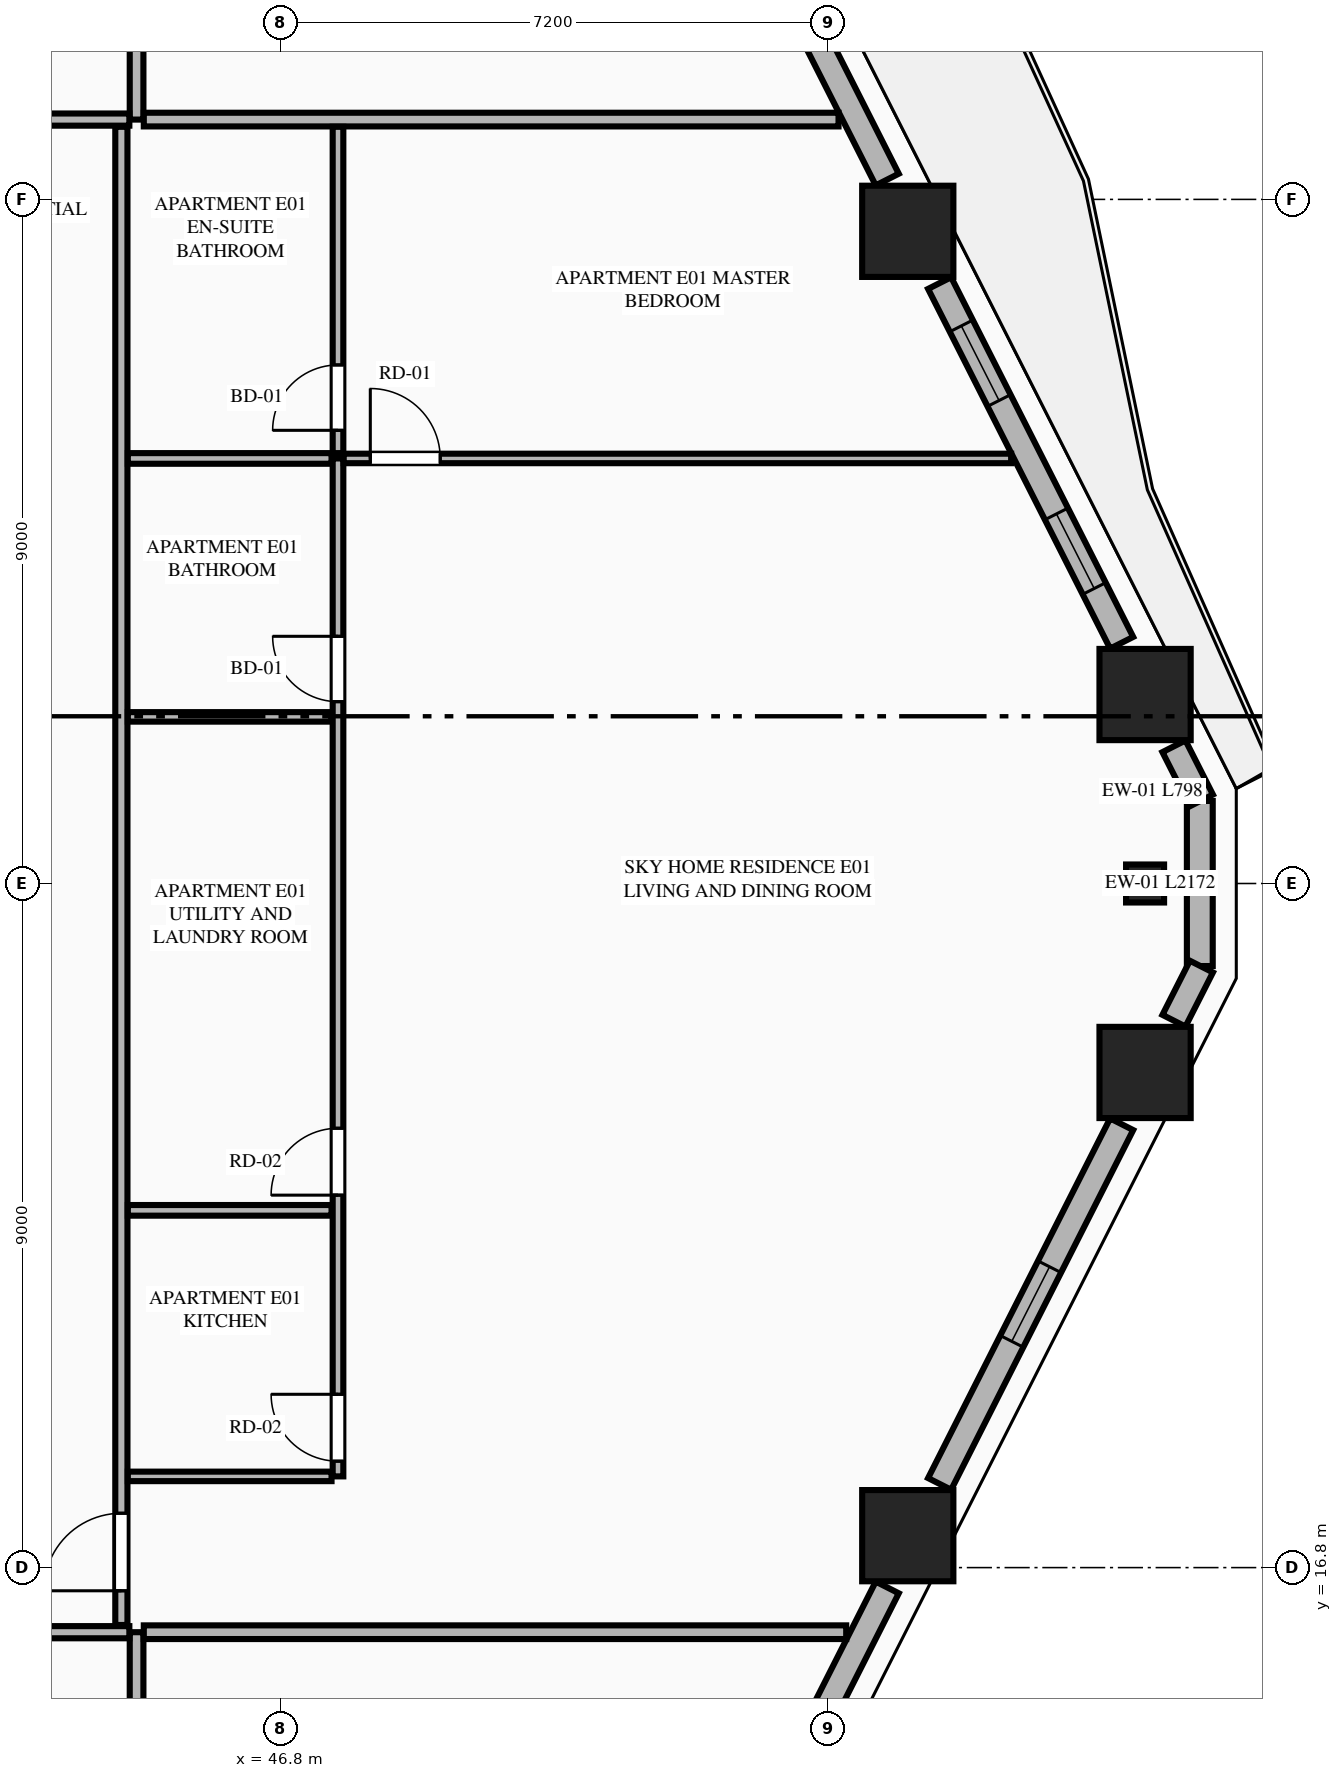
"""IFC4 building model, lengths in metres.
Left out: names, types, materials, properties, quantities, classifications, styles, units other than length and angle.
Written with IfcOpenShell. Run it as: python <this file> out.ifc"""

import sys

from ifc_helpers import new_model, si_unit, direction, frame, frame_2d, origin, origin_2d, place, context, subcontext, project, spatial, rectangle, extrude, element, fill, save


model = new_model("IFC4")
c1 = context("Model", 3, precision=1e-05, world=origin(), true_north=direction((0.0, 1.0)))
c2 = subcontext(c1, "Body", "Model", "MODEL_VIEW")
j1 = project(units=[si_unit("LENGTHUNIT", "METRE"), si_unit("PLANEANGLEUNIT", "RADIAN")], contexts=[c1])
p1 = place(None, origin())
s1 = spatial("IfcSite", under=j1, at=p1, CompositionType="ELEMENT")
p2 = place(p1, origin())
s2 = spatial("IfcBuilding", under=s1, at=p2, CompositionType="ELEMENT")
p3 = place(p2, frame((0.0, 0.0, 46.2)))
s3 = spatial("IfcBuildingStorey", under=s2, at=p3, CompositionType="ELEMENT", Elevation=46.2)
for number, where, z_axis, x_axis in (
    (1, (55.046, 17.22, 0.0), (0.0, 0.0, 1.0), (1.0, 0.0, 0.0)),
    (2, (58.168, 23.314, 0.0), (0.0, 0.0, 1.0), (1.0, 0.0, 0.0)),
    (3, (58.168, 28.286, 0.0), (0.0, 0.0, 1.0), (1.0, 0.0, 0.0)),
    (4, (55.046, 34.38, 0.0), (0.0, 0.0, 1.0), (1.0, 0.0, 0.0)),
):
    element("IfcColumn", number, at=place(p3, frame(where, z_axis=z_axis, x_axis=x_axis)), inside=s3, PredefinedType="COLUMN", context=c2, shape_type="SweptSolid", body=[
        extrude(rectangle(XDim=1.2, YDim=1.2, at=origin_2d()), origin(), (0.0, 0.0, 1.0), 3.55),
    ])
p4 = place(p3, frame((58.168, 25.8, 0.0), z_axis=(0.0, 0.0, 1.0), x_axis=(0.0, 1.0, 0.0)))
e5 = element("IfcColumn", 5, at=p4, inside=s3, PredefinedType="PILASTER", context=c2, shape_type="SweptSolid", body=[
    extrude(rectangle(XDim=0.5, YDim=0.35, at=origin_2d()), origin(), (0.0, 0.0, 1.0), 3.55),
])
p5 = place(p3, frame((58.888, 24.714, 0.0), z_axis=(0.0, 0.0, 1.0), x_axis=(0.0, 1.0, 0.0)))
e6 = element("IfcWall", 6, at=p5, inside=s3, PredefinedType="STANDARD", context=c2, shape_type="SweptSolid", body=[
    extrude(rectangle(XDim=2.172, YDim=0.34, at=frame_2d((1.086, 0.0))), origin(), (0.0, 0.0, 1.0), 3.33),
])
p6 = place(p3, frame((52.271, 11.59, 0.0), z_axis=(0.0, 0.0, 1.0), x_axis=(0.451592100298, 0.892224509273, 0.0)))
e7 = element("IfcWall", 7, at=p6, inside=s3, PredefinedType="STANDARD", context=c2, shape_type="SweptSolid", body=[
    extrude(rectangle(XDim=5.547, YDim=0.34, at=frame_2d((2.773, 0.0))), origin(), (0.0, 0.0, 1.0), 2.787),
])
p7 = place(p6, frame((2.223, 0.0, 0.75)))
e8 = element("IfcOpeningElement", 8, at=p7, cuts=e7, PredefinedType="OPENING", context=c2, shape_type="SweptSolid", body=[
    extrude(rectangle(XDim=1.1, YDim=1.887, at=frame_2d((0.55, 0.943))), frame((0.0, 0.18, 0.0), z_axis=(0.0, -1.0, 0.0), x_axis=(1.0, 0.0, 0.0)), (0.0, 0.0, 1.0), 0.36),
])
p8 = place(p3, frame((55.465, 17.901, 0.0), z_axis=(0.0, 0.0, 1.0), x_axis=(0.451572088722, 0.892234637686, 0.0)))
e9 = element("IfcWall", 9, at=p8, inside=s3, PredefinedType="STANDARD", context=c2, shape_type="SweptSolid", body=[
    extrude(rectangle(XDim=5.304, YDim=0.34, at=frame_2d((2.652, 0.0))), origin(), (0.0, 0.0, 1.0), 2.787),
])
p9 = place(p8, frame((2.102, 0.0, 0.75)))
e10 = element("IfcOpeningElement", 10, at=p9, cuts=e9, PredefinedType="OPENING", context=c2, shape_type="SweptSolid", body=[
    extrude(rectangle(XDim=1.1, YDim=1.887, at=frame_2d((0.55, 0.943))), frame((0.0, 0.18, 0.0), z_axis=(0.0, -1.0, 0.0), x_axis=(1.0, 0.0, 0.0)), (0.0, 0.0, 1.0), 0.36),
])
for number, where, z_axis, x_axis in (
    (11, (58.548, 23.995, 0.0), (0.0, 0.0, 1.0), (0.452, 0.892, 0.0)),
    (12, (58.909, 26.893, 0.0), (0.0, 0.0, 1.0), (-0.452, 0.892, 0.0)),
):
    element("IfcWall", number, at=place(p3, frame(where, z_axis=z_axis, x_axis=x_axis)), inside=s3, PredefinedType="STANDARD", context=c2, shape_type="SweptSolid", body=[
        extrude(rectangle(XDim=0.798, YDim=0.34, at=frame_2d((0.399, 0.0))), origin(), (0.0, 0.0, 1.0), 3.33),
    ])
p10 = place(p3, frame((57.86, 28.967, 0.0), z_axis=(0.0, 0.0, 1.0), x_axis=(-0.451590635984, 0.892225250422, 0.0)))
e13 = element("IfcWall", 13, at=p10, inside=s3, PredefinedType="STANDARD", context=c2, shape_type="SweptSolid", body=[
    extrude(rectangle(XDim=5.303, YDim=0.34, at=frame_2d((2.652, 0.0))), origin(), (0.0, 0.0, 1.0), 2.787),
])
p11 = place(p10, frame((0.8, 0.0, 0.75)))
e14 = element("IfcOpeningElement", 14, at=p11, cuts=e13, PredefinedType="OPENING", context=c2, shape_type="SweptSolid", body=[
    extrude(rectangle(XDim=1.1, YDim=1.887, at=frame_2d((0.55, 0.943))), frame((0.0, 0.18, 0.0), z_axis=(0.0, -1.0, 0.0), x_axis=(1.0, 0.0, 0.0)), (0.0, 0.0, 1.0), 0.36),
])
p12 = place(p10, frame((3.572, 0.0, 0.75)))
e15 = element("IfcOpeningElement", 15, at=p12, cuts=e13, PredefinedType="OPENING", context=c2, shape_type="SweptSolid", body=[
    extrude(rectangle(XDim=1.1, YDim=1.887, at=frame_2d((0.55, 0.943))), frame((0.0, 0.18, 0.0), z_axis=(0.0, -1.0, 0.0), x_axis=(1.0, 0.0, 0.0)), (0.0, 0.0, 1.0), 0.36),
])
p13 = place(p3, frame((54.776, 35.061, 0.0), z_axis=(0.0, 0.0, 1.0), x_axis=(-0.451592100298, 0.892224509273, 0.0)))
e16 = element("IfcWall", 16, at=p13, inside=s3, PredefinedType="STANDARD", context=c2, shape_type="SweptSolid", body=[
    extrude(rectangle(XDim=5.547, YDim=0.34, at=frame_2d((2.773, 0.0))), origin(), (0.0, 0.0, 1.0), 2.787),
])
p14 = place(p13, frame((2.791, 0.0, 0.0)))
e17 = element("IfcOpeningElement", 17, at=p14, cuts=e16, PredefinedType="OPENING", context=c2, shape_type="SweptSolid", body=[
    extrude(rectangle(XDim=1.1, YDim=2.25, at=frame_2d((0.55, 1.125))), frame((0.0, 0.18, 0.0), z_axis=(0.0, -1.0, 0.0), x_axis=(1.0, 0.0, 0.0)), (0.0, 0.0, 1.0), 0.36),
])
p15 = place(p3, frame((44.9, 2.455, 0.0), z_axis=(0.0, 0.0, 1.0), x_axis=(0.0, 1.0, 0.0)))
e18 = element("IfcWall", 18, at=p15, inside=s3, PredefinedType="PARTITIONING", context=c2, shape_type="SweptSolid", body=[
    extrude(rectangle(XDim=13.495, YDim=0.18, at=frame_2d((6.748, 0.0))), origin(), (0.0, 0.0, 1.0), 3.33),
])
p16 = place(p3, frame((19.995, 15.95, 0.0), z_axis=(0.0, 0.0, 1.0), x_axis=(1.0, 0.0, 0.0)))
e19 = element("IfcWall", 19, at=p16, inside=s3, PredefinedType="PARTITIONING", context=c2, shape_type="SweptSolid", body=[
    extrude(rectangle(XDim=24.81, YDim=0.16, at=frame_2d((12.405, 0.0))), origin(), (0.0, 0.0, 1.0), 3.33),
])
p17 = place(p16, frame((22.605, 0.0, 0.0)))
e20 = element("IfcOpeningElement", 20, at=p17, cuts=e19, PredefinedType="OPENING", context=c2, shape_type="SweptSolid", body=[
    extrude(rectangle(XDim=1.02, YDim=2.25, at=frame_2d((0.51, 1.125))), frame((0.0, 0.09, 0.0), z_axis=(0.0, -1.0, 0.0), x_axis=(1.0, 0.0, 0.0)), (0.0, 0.0, 1.0), 0.18),
])
p18 = place(p3, frame((44.9, 35.85, 0.0), z_axis=(0.0, 0.0, 1.0), x_axis=(0.0, 1.0, 0.0)))
e21 = element("IfcWall", 21, at=p18, inside=s3, PredefinedType="PARTITIONING", context=c2, shape_type="SweptSolid", body=[
    extrude(rectangle(XDim=13.295, YDim=0.18, at=frame_2d((6.647, 0.0))), origin(), (0.0, 0.0, 1.0), 3.33),
])
p19 = place(p3, frame((28.373, 35.85, 0.0), z_axis=(0.0, 0.0, 1.0), x_axis=(1.0, 0.0, 0.0)))
e22 = element("IfcWall", 22, at=p19, inside=s3, PredefinedType="PARTITIONING", context=c2, shape_type="SweptSolid", body=[
    extrude(rectangle(XDim=16.432, YDim=0.16, at=frame_2d((8.216, 0.0))), origin(), (0.0, 0.0, 1.0), 3.33),
])
p20 = place(p19, frame((0.355, 0.0, 0.0)))
e23 = element("IfcOpeningElement", 23, at=p20, cuts=e22, PredefinedType="OPENING", context=c2, shape_type="SweptSolid", body=[
    extrude(rectangle(XDim=1.35, YDim=2.35, at=frame_2d((0.675, 1.175))), frame((0.0, 0.09, 0.0), z_axis=(0.0, -1.0, 0.0), x_axis=(1.0, 0.0, 0.0)), (0.0, 0.0, 1.0), 0.18),
])
p21 = place(p3, frame((44.995, 15.95, 0.0), z_axis=(0.0, 0.0, 1.0), x_axis=(1.0, 0.0, 0.0)))
e24 = element("IfcWall", 24, at=p21, inside=s3, PredefinedType="PARTITIONING", context=c2, shape_type="SweptSolid", body=[
    extrude(rectangle(XDim=9.241, YDim=0.18, at=frame_2d((4.621, 0.0))), origin(), (0.0, 0.0, 1.0), 3.33),
])
p22 = place(p3, frame((44.995, 35.85, 0.0), z_axis=(0.0, 0.0, 1.0), x_axis=(1.0, 0.0, 0.0)))
e25 = element("IfcWall", 25, at=p22, inside=s3, PredefinedType="PARTITIONING", context=c2, shape_type="SweptSolid", body=[
    extrude(rectangle(XDim=9.14, YDim=0.18, at=frame_2d((4.57, 0.0))), origin(), (0.0, 0.0, 1.0), 3.33),
])
p23 = place(p3, frame((44.7, 16.045, 0.0), z_axis=(0.0, 0.0, 1.0), x_axis=(0.0, 1.0, 0.0)))
e26 = element("IfcWall", 26, at=p23, inside=s3, PredefinedType="PARTITIONING", context=c2, shape_type="SweptSolid", body=[
    extrude(rectangle(XDim=19.71, YDim=0.16, at=frame_2d((9.855, 0.0))), origin(), (0.0, 0.0, 1.0), 3.33),
])
p24 = place(p23, frame((0.45, 0.0, 0.0)))
e27 = element("IfcOpeningElement", 27, at=p24, cuts=e26, PredefinedType="OPENING", context=c2, shape_type="SweptSolid", body=[
    extrude(rectangle(XDim=1.02, YDim=2.25, at=frame_2d((0.51, 1.125))), frame((0.0, 0.09, 0.0), z_axis=(0.0, -1.0, 0.0), x_axis=(1.0, 0.0, 0.0)), (0.0, 0.0, 1.0), 0.18),
])
p25 = place(p3, frame((44.785, 18.0, 0.0), z_axis=(0.0, 0.0, 1.0), x_axis=(1.0, 0.0, 0.0)))
e28 = element("IfcWall", 28, at=p25, inside=s3, PredefinedType="PARTITIONING", context=c2, shape_type="SweptSolid", body=[
    extrude(rectangle(XDim=2.68, YDim=0.125, at=frame_2d((1.34, 0.0))), origin(), (0.0, 0.0, 1.0), 2.637),
])
p26 = place(p3, frame((47.55, 18.0, 0.0), z_axis=(0.0, 0.0, 1.0), x_axis=(0.0, 1.0, 0.0)))
e29 = element("IfcWall", 29, at=p26, inside=s3, PredefinedType="PLUMBINGWALL", context=c2, shape_type="SweptSolid", body=[
    extrude(rectangle(XDim=13.392, YDim=0.14, at=frame_2d((6.696, 0.0))), origin(), (0.0, 0.0, 1.0), 3.33),
])
p27 = place(p26, frame((0.2, 0.0, 0.0)))
e30 = element("IfcOpeningElement", 30, at=p27, cuts=e29, PredefinedType="OPENING", context=c2, shape_type="SweptSolid", body=[
    extrude(rectangle(XDim=0.88, YDim=2.15, at=frame_2d((0.44, 1.075))), frame((0.0, 0.08, 0.0), z_axis=(0.0, -1.0, 0.0), x_axis=(1.0, 0.0, 0.0)), (0.0, 0.0, 1.0), 0.16),
])
p28 = place(p26, frame((3.7, 0.0, 0.0)))
e31 = element("IfcOpeningElement", 31, at=p28, cuts=e29, PredefinedType="OPENING", context=c2, shape_type="SweptSolid", body=[
    extrude(rectangle(XDim=0.88, YDim=2.15, at=frame_2d((0.44, 1.075))), frame((0.0, 0.08, 0.0), z_axis=(0.0, -1.0, 0.0), x_axis=(1.0, 0.0, 0.0)), (0.0, 0.0, 1.0), 0.16),
])
p29 = place(p26, frame((10.192, 0.0, 0.0)))
e32 = element("IfcOpeningElement", 32, at=p29, cuts=e29, PredefinedType="OPENING", context=c2, shape_type="SweptSolid", body=[
    extrude(rectangle(XDim=0.86, YDim=2.1, at=frame_2d((0.43, 1.05))), frame((0.0, 0.08, 0.0), z_axis=(0.0, -1.0, 0.0), x_axis=(1.0, 0.0, 0.0)), (0.0, 0.0, 1.0), 0.16),
])
p30 = place(p3, frame((47.55, 31.462, 0.0), z_axis=(0.0, 0.0, 1.0), x_axis=(0.0, 1.0, 0.0)))
e33 = element("IfcWall", 33, at=p30, inside=s3, PredefinedType="PLUMBINGWALL", context=c2, shape_type="SweptSolid", body=[
    extrude(rectangle(XDim=4.293, YDim=0.14, at=frame_2d((2.146, 0.0))), origin(), (0.0, 0.0, 1.0), 3.33),
])
p31 = place(p30, frame((0.3, 0.0, 0.0)))
e34 = element("IfcOpeningElement", 34, at=p31, cuts=e33, PredefinedType="OPENING", context=c2, shape_type="SweptSolid", body=[
    extrude(rectangle(XDim=0.86, YDim=2.1, at=frame_2d((0.43, 1.05))), frame((0.0, 0.08, 0.0), z_axis=(0.0, -1.0, 0.0), x_axis=(1.0, 0.0, 0.0)), (0.0, 0.0, 1.0), 0.16),
])
p32 = place(p3, frame((44.785, 31.392, 0.0), z_axis=(0.0, 0.0, 1.0), x_axis=(1.0, 0.0, 0.0)))
e35 = element("IfcWall", 35, at=p32, inside=s3, PredefinedType="PLUMBINGWALL", context=c2, shape_type="SweptSolid", body=[
    extrude(rectangle(XDim=2.68, YDim=0.14, at=frame_2d((1.34, 0.0))), origin(), (0.0, 0.0, 1.0), 3.33),
])
p33 = place(p3, frame((47.625, 31.392, 0.0), z_axis=(0.0, 0.0, 1.0), x_axis=(1.0, 0.0, 0.0)))
e36 = element("IfcWall", 36, at=p33, inside=s3, PredefinedType="PARTITIONING", context=c2, shape_type="SweptSolid", body=[
    extrude(rectangle(XDim=8.781, YDim=0.125, at=frame_2d((4.391, 0.0))), origin(), (0.0, 0.0, 1.0), 3.33),
])
p34 = place(p33, frame((0.35, 0.0, 0.0)))
e37 = element("IfcOpeningElement", 37, at=p34, cuts=e36, PredefinedType="OPENING", context=c2, shape_type="SweptSolid", body=[
    extrude(rectangle(XDim=0.92, YDim=2.15, at=frame_2d((0.46, 1.075))), frame((0.0, 0.073, 0.0), z_axis=(0.0, -1.0, 0.0), x_axis=(1.0, 0.0, 0.0)), (0.0, 0.0, 1.0), 0.145),
])
p35 = place(p3, frame((44.785, 21.5, 0.0), z_axis=(0.0, 0.0, 1.0), x_axis=(1.0, 0.0, 0.0)))
e38 = element("IfcWall", 38, at=p35, inside=s3, PredefinedType="PLUMBINGWALL", context=c2, shape_type="SweptSolid", body=[
    extrude(rectangle(XDim=2.68, YDim=0.14, at=frame_2d((1.34, 0.0))), origin(), (0.0, 0.0, 1.0), 3.33),
])
p36 = place(p3, frame((44.785, 27.992, 0.0), z_axis=(0.0, 0.0, 1.0), x_axis=(1.0, 0.0, 0.0)))
e39 = element("IfcWall", 39, at=p36, inside=s3, PredefinedType="PARTITIONING", context=c2, shape_type="SweptSolid", body=[
    extrude(rectangle(XDim=2.68, YDim=0.125, at=frame_2d((1.34, 0.0))), origin(), (0.0, 0.0, 1.0), 3.33),
])
p37 = place(p9, origin())
e40 = element("IfcWindow", 40, at=p37, inside=s3, PartitioningType="SINGLE_PANEL", PredefinedType="WINDOW", context=c2, shape_type="SweptSolid", body=[
    extrude(rectangle(XDim=1.1, YDim=1.887, at=frame_2d((0.55, 0.943))), frame((0.0, 0.03, 0.0), z_axis=(0.0, -1.0, 0.0), x_axis=(1.0, 0.0, 0.0)), (0.0, 0.0, 1.0), 0.06),
])
fill(e10, e40)
p38 = place(p11, origin())
e41 = element("IfcWindow", 41, at=p38, inside=s3, PartitioningType="SINGLE_PANEL", PredefinedType="WINDOW", context=c2, shape_type="SweptSolid", body=[
    extrude(rectangle(XDim=1.1, YDim=1.887, at=frame_2d((0.55, 0.943))), frame((0.0, 0.03, 0.0), z_axis=(0.0, -1.0, 0.0), x_axis=(1.0, 0.0, 0.0)), (0.0, 0.0, 1.0), 0.06),
])
fill(e14, e41)
p39 = place(p27, origin())
e42 = element("IfcDoor", 42, at=p39, inside=s3, OperationType="SINGLE_SWING_RIGHT", PredefinedType="DOOR", context=c2, shape_type="SweptSolid", body=[
    extrude(rectangle(XDim=0.88, YDim=2.15, at=frame_2d((0.44, 1.075))), frame((0.0, 0.025, 0.0), z_axis=(0.0, -1.0, 0.0), x_axis=(1.0, 0.0, 0.0)), (0.0, 0.0, 1.0), 0.05),
])
fill(e30, e42)
p40 = place(p28, origin())
e43 = element("IfcDoor", 43, at=p40, inside=s3, OperationType="SINGLE_SWING_LEFT", PredefinedType="DOOR", context=c2, shape_type="SweptSolid", body=[
    extrude(rectangle(XDim=0.88, YDim=2.15, at=frame_2d((0.44, 1.075))), frame((0.0, 0.025, 0.0), z_axis=(0.0, -1.0, 0.0), x_axis=(1.0, 0.0, 0.0)), (0.0, 0.0, 1.0), 0.05),
])
fill(e31, e43)
p41 = place(p29, origin())
e44 = element("IfcDoor", 44, at=p41, inside=s3, OperationType="SINGLE_SWING_RIGHT", PredefinedType="DOOR", context=c2, shape_type="SweptSolid", body=[
    extrude(rectangle(XDim=0.86, YDim=2.1, at=frame_2d((0.43, 1.05))), frame((0.0, 0.025, 0.0), z_axis=(0.0, -1.0, 0.0), x_axis=(1.0, 0.0, 0.0)), (0.0, 0.0, 1.0), 0.05),
])
fill(e32, e44)
p42 = place(p31, origin())
e45 = element("IfcDoor", 45, at=p42, inside=s3, OperationType="SINGLE_SWING_LEFT", PredefinedType="DOOR", context=c2, shape_type="SweptSolid", body=[
    extrude(rectangle(XDim=0.86, YDim=2.1, at=frame_2d((0.43, 1.05))), frame((0.0, 0.025, 0.0), z_axis=(0.0, -1.0, 0.0), x_axis=(1.0, 0.0, 0.0)), (0.0, 0.0, 1.0), 0.05),
])
fill(e34, e45)
p43 = place(p24, origin())
e46 = element("IfcDoor", 46, at=p43, inside=s3, OperationType="SINGLE_SWING_LEFT", PredefinedType="DOOR", context=c2, shape_type="SweptSolid", body=[
    extrude(rectangle(XDim=1.02, YDim=2.25, at=frame_2d((0.51, 1.125))), frame((0.0, 0.025, 0.0), z_axis=(0.0, -1.0, 0.0), x_axis=(1.0, 0.0, 0.0)), (0.0, 0.0, 1.0), 0.05),
])
fill(e27, e46)
p44 = place(p34, origin())
e47 = element("IfcDoor", 47, at=p44, inside=s3, OperationType="SINGLE_SWING_LEFT", PredefinedType="DOOR", context=c2, shape_type="SweptSolid", body=[
    extrude(rectangle(XDim=0.92, YDim=2.15, at=frame_2d((0.46, 1.075))), frame((0.0, 0.025, 0.0), z_axis=(0.0, -1.0, 0.0), x_axis=(1.0, 0.0, 0.0)), (0.0, 0.0, 1.0), 0.05),
])
fill(e37, e47)
p45 = place(p12, origin())
e48 = element("IfcWindow", 48, at=p45, inside=s3, PartitioningType="SINGLE_PANEL", PredefinedType="WINDOW", context=c2, shape_type="SweptSolid", body=[
    extrude(rectangle(XDim=1.1, YDim=1.887, at=frame_2d((0.55, 0.943))), frame((0.0, 0.03, 0.0), z_axis=(0.0, -1.0, 0.0), x_axis=(1.0, 0.0, 0.0)), (0.0, 0.0, 1.0), 0.06),
])
fill(e15, e48)
save(model, sys.argv[1])
